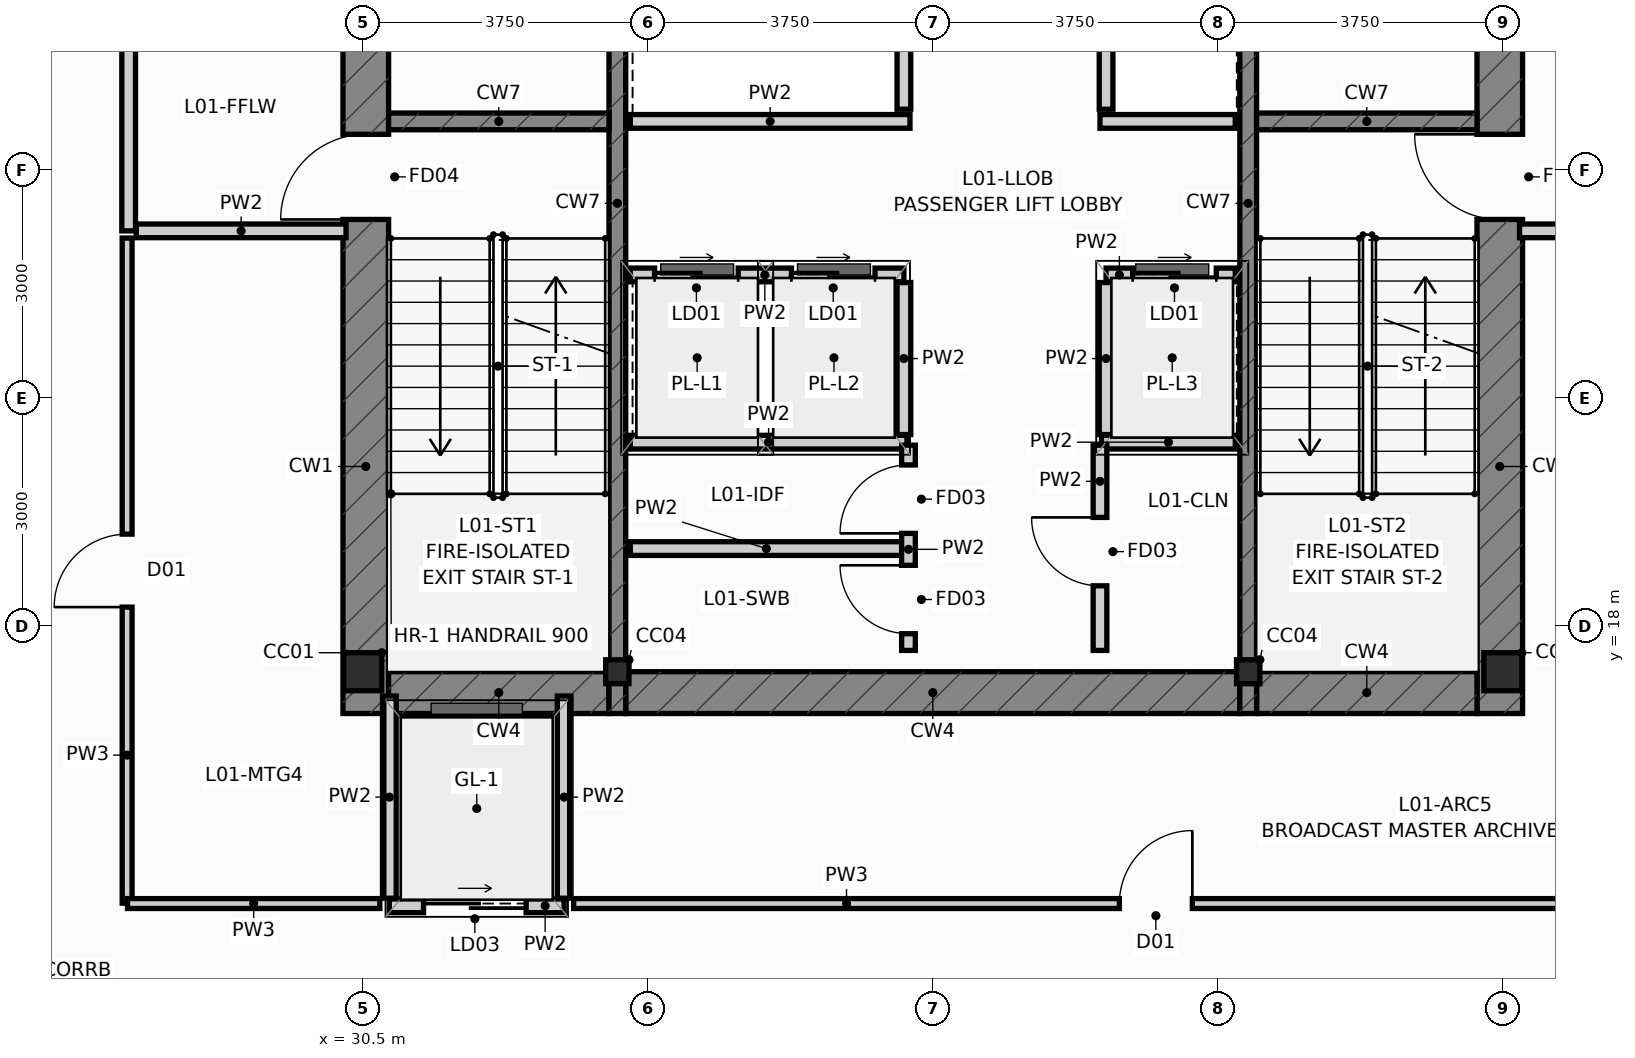
"""IFC4 building model, lengths in metres.
Left out: names, types, materials, properties, quantities, classifications, styles, units other than length and angle.
Written with IfcOpenShell. Run it as: python <this file> out.ifc"""

import sys

from ifc_helpers import new_model, si_unit, direction, frame, frame_2d, origin, origin_2d, place, context, subcontext, project, spatial, rectangle, i_section, extrude, source, transform, mapped, element, fill, save


model = new_model("IFC4")
c1 = context("Model", 3, precision=1e-05, world=origin(), true_north=direction((0.0, 1.0)))
c2 = subcontext(c1, "Body", "Model", "MODEL_VIEW")
j1 = project(units=[si_unit("LENGTHUNIT", "METRE"), si_unit("PLANEANGLEUNIT", "RADIAN")], contexts=[c1])
p1 = place(None, origin())
s1 = spatial("IfcSite", under=j1, at=p1, CompositionType="ELEMENT")
p2 = place(p1, origin())
s2 = spatial("IfcBuilding", under=s1, at=p2, CompositionType="ELEMENT")
p3 = place(p2, frame((0.0, 0.0, 5.4)))
s3 = spatial("IfcBuildingStorey", under=s2, at=p3, CompositionType="ELEMENT", Elevation=5.4)
m1 = source(origin(), c2, "Body", "SweptSolid", [
    extrude(i_section(OverallWidth=0.5, OverallDepth=0.5, WebThickness=0.028, FlangeThickness=0.04, at=origin_2d()), origin(), (0.0, 0.0, 1.0), 4.8),
])
for number, where, z_axis, x_axis in (
    (1, (30.5, 17.4, 0.0), (0.0, 0.0, 1.0), (1.0, 0.0, 0.0)),
    (2, (45.5, 17.4, 0.0), (0.0, 0.0, 1.0), (1.0, 0.0, 0.0)),
):
    element("IfcColumn", number, at=place(p3, frame(where, z_axis=z_axis, x_axis=x_axis)), inside=s3, PredefinedType="COLUMN", context=c2, shape_type="MappedRepresentation", body=[
        mapped(m1, transform((0.0, 0.0, 0.0), scale=1.0)),
    ])
m2 = source(origin(), c2, "Body", "SweptSolid", [
    extrude(i_section(OverallWidth=0.307, OverallDepth=0.315, WebThickness=0.012, FlangeThickness=0.019, at=origin_2d()), origin(), (0.0, 0.0, 1.0), 4.8),
])
for number, where, z_axis, x_axis in (
    (3, (33.85, 17.4, 0.0), (0.0, 0.0, 1.0), (1.0, 0.0, 0.0)),
    (4, (42.15, 17.4, 0.0), (0.0, 0.0, 1.0), (1.0, 0.0, 0.0)),
):
    element("IfcColumn", number, at=place(p3, frame(where, z_axis=z_axis, x_axis=x_axis)), inside=s3, PredefinedType="COLUMN", context=c2, shape_type="MappedRepresentation", body=[
        mapped(m2, transform((0.0, 0.0, 0.0), scale=1.0)),
    ])
p4 = place(p3, frame((30.54, 16.85, 0.0), z_axis=(0.0, 0.0, 1.0), x_axis=(0.0, 1.0, 0.0)))
e5 = element("IfcWall", 5, at=p4, inside=s3, PredefinedType="SHEAR", context=c2, shape_type="SweptSolid", body=[
    extrude(rectangle(XDim=13.425, YDim=0.6, at=frame_2d((6.712, 0.0))), origin(), (0.0, 0.0, 1.0), 4.8),
])
p5 = place(p4, frame((6.5, 0.0, 0.0)))
e6 = element("IfcOpeningElement", 6, at=p5, cuts=e5, PredefinedType="OPENING", context=c2, shape_type="SweptSolid", body=[
    extrude(rectangle(XDim=1.12, YDim=2.15, at=frame_2d((0.56, 1.075))), frame((0.0, 0.312, 0.0), z_axis=(0.0, -1.0, 0.0), x_axis=(1.0, 0.0, 0.0)), (0.0, 0.0, 1.0), 0.624),
])
p6 = place(p4, frame((10.95, 0.0, 0.0)))
e7 = element("IfcOpeningElement", 7, at=p6, cuts=e5, PredefinedType="OPENING", context=c2, shape_type="SweptSolid", body=[
    extrude(rectangle(XDim=1.2, YDim=2.2, at=frame_2d((0.6, 1.1))), frame((0.0, 0.312, 0.0), z_axis=(0.0, -1.0, 0.0), x_axis=(1.0, 0.0, 0.0)), (0.0, 0.0, 1.0), 0.624),
])
p7 = place(p3, frame((45.46, 16.85, 0.0), z_axis=(0.0, 0.0, 1.0), x_axis=(0.0, 1.0, 0.0)))
e8 = element("IfcWall", 8, at=p7, inside=s3, PredefinedType="SHEAR", context=c2, shape_type="SweptSolid", body=[
    extrude(rectangle(XDim=13.425, YDim=0.6, at=frame_2d((6.712, 0.0))), origin(), (0.0, 0.0, 1.0), 4.8),
])
p8 = place(p7, frame((6.5, 0.0, 0.0)))
e9 = element("IfcOpeningElement", 9, at=p8, cuts=e8, PredefinedType="OPENING", context=c2, shape_type="SweptSolid", body=[
    extrude(rectangle(XDim=1.12, YDim=2.15, at=frame_2d((0.56, 1.075))), frame((0.0, 0.312, 0.0), z_axis=(0.0, -1.0, 0.0), x_axis=(1.0, 0.0, 0.0)), (0.0, 0.0, 1.0), 0.624),
])
p9 = place(p7, frame((10.95, 0.0, 0.0)))
e10 = element("IfcOpeningElement", 10, at=p9, cuts=e8, PredefinedType="OPENING", context=c2, shape_type="SweptSolid", body=[
    extrude(rectangle(XDim=1.2, YDim=2.2, at=frame_2d((0.6, 1.1))), frame((0.0, 0.312, 0.0), z_axis=(0.0, -1.0, 0.0), x_axis=(1.0, 0.0, 0.0)), (0.0, 0.0, 1.0), 0.624),
])
p10 = place(p3, frame((30.84, 17.125, 0.0), z_axis=(0.0, 0.0, 1.0), x_axis=(1.0, 0.0, 0.0)))
e11 = element("IfcWall", 11, at=p10, inside=s3, PredefinedType="SHEAR", context=c2, shape_type="SweptSolid", body=[
    extrude(rectangle(XDim=2.9, YDim=0.55, at=frame_2d((1.45, 0.0))), origin(), (0.0, 0.0, 1.0), 4.8),
])
p11 = place(p3, frame((33.96, 17.125, 0.0), z_axis=(0.0, 0.0, 1.0), x_axis=(1.0, 0.0, 0.0)))
e12 = element("IfcWall", 12, at=p11, inside=s3, PredefinedType="SHEAR", context=c2, shape_type="SweptSolid", body=[
    extrude(rectangle(XDim=8.08, YDim=0.55, at=frame_2d((4.04, 0.0))), origin(), (0.0, 0.0, 1.0), 4.8),
])
p12 = place(p3, frame((42.26, 17.125, 0.0), z_axis=(0.0, 0.0, 1.0), x_axis=(1.0, 0.0, 0.0)))
e13 = element("IfcWall", 13, at=p12, inside=s3, PredefinedType="SHEAR", context=c2, shape_type="SweptSolid", body=[
    extrude(rectangle(XDim=2.9, YDim=0.55, at=frame_2d((1.45, 0.0))), origin(), (0.0, 0.0, 1.0), 4.8),
])
for number, where, z_axis, x_axis in (
    (14, (33.85, 16.85, 0.0), (0.0, 0.0, 1.0), (0.0, 1.0, 0.0)),
    (15, (42.15, 16.85, 0.0), (0.0, 0.0, 1.0), (0.0, 1.0, 0.0)),
):
    element("IfcWall", number, at=place(p3, frame(where, z_axis=z_axis, x_axis=x_axis)), inside=s3, PredefinedType="SHEAR", context=c2, shape_type="SweptSolid", body=[
        extrude(rectangle(XDim=13.425, YDim=0.22, at=frame_2d((6.712, 0.0))), origin(), (0.0, 0.0, 1.0), 4.8),
    ])
for number, where, z_axis, x_axis in (
    (16, (30.84, 24.64, 0.0), (0.0, 0.0, 1.0), (1.0, 0.0, 0.0)),
    (17, (42.26, 24.64, 0.0), (0.0, 0.0, 1.0), (1.0, 0.0, 0.0)),
):
    element("IfcWall", number, at=place(p3, frame(where, z_axis=z_axis, x_axis=x_axis)), inside=s3, PredefinedType="SHEAR", context=c2, shape_type="SweptSolid", body=[
        extrude(rectangle(XDim=2.9, YDim=0.22, at=frame_2d((1.45, 0.0))), origin(), (0.0, 0.0, 1.0), 4.8),
    ])
p13 = place(p3, frame((30.85, 14.32, 0.0), z_axis=(0.0, 0.0, 1.0), x_axis=(1.0, 0.0, 0.0)))
e18 = element("IfcWall", 18, at=p13, inside=s3, PredefinedType="PARTITIONING", context=c2, shape_type="SweptSolid", body=[
    extrude(rectangle(XDim=2.3, YDim=0.18, at=frame_2d((1.15, 0.0))), origin(), (0.0, 0.0, 1.0), 4.48),
])
p14 = place(p13, frame((0.45, 0.0, 0.0)))
e19 = element("IfcOpeningElement", 19, at=p14, cuts=e18, PredefinedType="OPENING", context=c2, shape_type="SweptSolid", body=[
    extrude(rectangle(XDim=1.35, YDim=2.25, at=frame_2d((0.675, 1.125))), frame((0.0, 0.102, 0.0), z_axis=(0.0, -1.0, 0.0), x_axis=(1.0, 0.0, 0.0)), (0.0, 0.0, 1.0), 0.204),
])
p15 = place(p3, frame((30.85, 14.42, 0.0), z_axis=(0.0, 0.0, 1.0), x_axis=(0.0, 1.0, 0.0)))
e20 = element("IfcWall", 20, at=p15, inside=s3, PredefinedType="PARTITIONING", context=c2, shape_type="SweptSolid", body=[
    extrude(rectangle(XDim=2.66, YDim=0.18, at=frame_2d((1.33, 0.0))), origin(), (0.0, 0.0, 1.0), 3.854),
])
p16 = place(p3, frame((33.15, 14.42, 0.0), z_axis=(0.0, 0.0, 1.0), x_axis=(0.0, 1.0, 0.0)))
e21 = element("IfcWall", 21, at=p16, inside=s3, PredefinedType="PARTITIONING", context=c2, shape_type="SweptSolid", body=[
    extrude(rectangle(XDim=2.66, YDim=0.18, at=frame_2d((1.33, 0.0))), origin(), (0.0, 0.0, 1.0), 4.48),
])
p17 = place(p3, frame((34.02, 22.62, 0.0), z_axis=(0.0, 0.0, 1.0), x_axis=(1.0, 0.0, 0.0)))
e22 = element("IfcWall", 22, at=p17, inside=s3, PredefinedType="PARTITIONING", context=c2, shape_type="SweptSolid", body=[
    extrude(rectangle(XDim=3.6, YDim=0.18, at=frame_2d((1.8, 0.0))), origin(), (0.0, 0.0, 1.0), 4.48),
])
p18 = place(p17, frame((0.32, 0.0, 0.0)))
e23 = element("IfcOpeningElement", 23, at=p18, cuts=e22, PredefinedType="OPENING", context=c2, shape_type="SweptSolid", body=[
    extrude(rectangle(XDim=1.1, YDim=2.2, at=frame_2d((0.55, 1.1))), frame((0.0, 0.102, 0.0), z_axis=(0.0, -1.0, 0.0), x_axis=(1.0, 0.0, 0.0)), (0.0, 0.0, 1.0), 0.204),
])
p19 = place(p17, frame((2.12, 0.0, 0.0)))
e24 = element("IfcOpeningElement", 24, at=p19, cuts=e22, PredefinedType="OPENING", context=c2, shape_type="SweptSolid", body=[
    extrude(rectangle(XDim=1.1, YDim=2.2, at=frame_2d((0.55, 1.1))), frame((0.0, 0.102, 0.0), z_axis=(0.0, -1.0, 0.0), x_axis=(1.0, 0.0, 0.0)), (0.0, 0.0, 1.0), 0.204),
])
p20 = place(p3, frame((40.28, 22.62, 0.0), z_axis=(0.0, 0.0, 1.0), x_axis=(1.0, 0.0, 0.0)))
e25 = element("IfcWall", 25, at=p20, inside=s3, PredefinedType="PARTITIONING", context=c2, shape_type="SweptSolid", body=[
    extrude(rectangle(XDim=1.7, YDim=0.18, at=frame_2d((0.85, 0.0))), origin(), (0.0, 0.0, 1.0), 4.48),
])
p21 = place(p20, frame((0.35, 0.0, 0.0)))
e26 = element("IfcOpeningElement", 26, at=p21, cuts=e25, PredefinedType="OPENING", context=c2, shape_type="SweptSolid", body=[
    extrude(rectangle(XDim=1.1, YDim=2.2, at=frame_2d((0.55, 1.1))), frame((0.0, 0.102, 0.0), z_axis=(0.0, -1.0, 0.0), x_axis=(1.0, 0.0, 0.0)), (0.0, 0.0, 1.0), 0.204),
])
for number, where, z_axis, x_axis in (
    (27, (37.62, 20.52, 0.0), (0.0, 0.0, 1.0), (0.0, 1.0, 0.0)),
    (28, (40.28, 20.52, 0.0), (0.0, 0.0, 1.0), (0.0, 1.0, 0.0)),
    (29, (37.62, 24.8, 0.0), (0.0, 0.0, 1.0), (0.0, 1.0, 0.0)),
    (30, (40.28, 24.8, 0.0), (0.0, 0.0, 1.0), (0.0, 1.0, 0.0)),
):
    element("IfcWall", number, at=place(p3, frame(where, z_axis=z_axis, x_axis=x_axis)), inside=s3, PredefinedType="PARTITIONING", context=c2, shape_type="SweptSolid", body=[
        extrude(rectangle(XDim=2.0, YDim=0.18, at=frame_2d((1.0, 0.0))), origin(), (0.0, 0.0, 1.0), 4.48),
    ])
p22 = place(p3, frame((34.02, 24.64, 0.0), z_axis=(0.0, 0.0, 1.0), x_axis=(1.0, 0.0, 0.0)))
e31 = element("IfcWall", 31, at=p22, inside=s3, PredefinedType="PARTITIONING", context=c2, shape_type="SweptSolid", body=[
    extrude(rectangle(XDim=3.68, YDim=0.18, at=frame_2d((1.84, 0.0))), origin(), (0.0, 0.0, 1.0), 4.48),
])
p23 = place(p3, frame((40.2, 24.64, 0.0), z_axis=(0.0, 0.0, 1.0), x_axis=(1.0, 0.0, 0.0)))
e32 = element("IfcWall", 32, at=p23, inside=s3, PredefinedType="PARTITIONING", context=c2, shape_type="SweptSolid", body=[
    extrude(rectangle(XDim=1.78, YDim=0.18, at=frame_2d((0.89, 0.0))), origin(), (0.0, 0.0, 1.0), 4.48),
])
p24 = place(p3, frame((27.42, 23.2, 0.0), z_axis=(0.0, 0.0, 1.0), x_axis=(0.0, 1.0, 0.0)))
e33 = element("IfcWall", 33, at=p24, inside=s3, PredefinedType="PARTITIONING", context=c2, shape_type="SweptSolid", body=[
    extrude(rectangle(XDim=6.4, YDim=0.18, at=frame_2d((3.2, 0.0))), origin(), (0.0, 0.0, 1.0), 4.106),
])
p25 = place(p24, frame((2.65, 0.0, 0.0)))
e34 = element("IfcOpeningElement", 34, at=p25, cuts=e33, PredefinedType="OPENING", context=c2, shape_type="SweptSolid", body=[
    extrude(rectangle(XDim=1.05, YDim=2.15, at=frame_2d((0.525, 1.075))), frame((0.0, 0.102, 0.0), z_axis=(0.0, -1.0, 0.0), x_axis=(1.0, 0.0, 0.0)), (0.0, 0.0, 1.0), 0.204),
])
for number, where, z_axis, x_axis in (
    (35, (27.52, 23.2, 0.0), (0.0, 0.0, 1.0), (1.0, 0.0, 0.0)),
    (36, (45.72, 23.2, 0.0), (0.0, 0.0, 1.0), (1.0, 0.0, 0.0)),
):
    element("IfcWall", number, at=place(p3, frame(where, z_axis=z_axis, x_axis=x_axis)), inside=s3, PredefinedType="PARTITIONING", context=c2, shape_type="SweptSolid", body=[
        extrude(rectangle(XDim=2.76, YDim=0.18, at=frame_2d((1.38, 0.0))), origin(), (0.0, 0.0, 1.0), 4.48),
    ])
p26 = place(p3, frame((34.02, 20.42, 0.0), z_axis=(0.0, 0.0, 1.0), x_axis=(1.0, 0.0, 0.0)))
e37 = element("IfcWall", 37, at=p26, inside=s3, PredefinedType="PARTITIONING", context=c2, shape_type="SweptSolid", body=[
    extrude(rectangle(XDim=3.64, YDim=0.18, at=frame_2d((1.82, 0.0))), origin(), (0.0, 0.0, 1.0), 4.48),
])
p27 = place(p3, frame((40.22, 20.42, 0.0), z_axis=(0.0, 0.0, 1.0), x_axis=(1.0, 0.0, 0.0)))
e38 = element("IfcWall", 38, at=p27, inside=s3, PredefinedType="PARTITIONING", context=c2, shape_type="SweptSolid", body=[
    extrude(rectangle(XDim=1.76, YDim=0.18, at=frame_2d((0.88, 0.0))), origin(), (0.0, 0.0, 1.0), 4.48),
])
p28 = place(p3, frame((34.02, 19.02, 0.0), z_axis=(0.0, 0.0, 1.0), x_axis=(1.0, 0.0, 0.0)))
e39 = element("IfcWall", 39, at=p28, inside=s3, PredefinedType="PARTITIONING", context=c2, shape_type="SweptSolid", body=[
    extrude(rectangle(XDim=3.58, YDim=0.18, at=frame_2d((1.79, 0.0))), origin(), (0.0, 0.0, 1.0), 4.48),
])
p29 = place(p3, frame((37.68, 17.68, 0.0), z_axis=(0.0, 0.0, 1.0), x_axis=(0.0, 1.0, 0.0)))
e40 = element("IfcWall", 40, at=p29, inside=s3, PredefinedType="PARTITIONING", context=c2, shape_type="SweptSolid", body=[
    extrude(rectangle(XDim=2.7, YDim=0.18, at=frame_2d((1.35, 0.0))), origin(), (0.0, 0.0, 1.0), 4.48),
])
p30 = place(p29, frame((0.22, 0.0, 0.0)))
e41 = element("IfcOpeningElement", 41, at=p30, cuts=e40, PredefinedType="OPENING", context=c2, shape_type="SweptSolid", body=[
    extrude(rectangle(XDim=0.9, YDim=2.1, at=frame_2d((0.45, 1.05))), frame((0.0, 0.102, 0.0), z_axis=(0.0, -1.0, 0.0), x_axis=(1.0, 0.0, 0.0)), (0.0, 0.0, 1.0), 0.204),
])
p31 = place(p29, frame((1.54, 0.0, 0.0)))
e42 = element("IfcOpeningElement", 42, at=p31, cuts=e40, PredefinedType="OPENING", context=c2, shape_type="SweptSolid", body=[
    extrude(rectangle(XDim=0.9, YDim=2.1, at=frame_2d((0.45, 1.05))), frame((0.0, 0.102, 0.0), z_axis=(0.0, -1.0, 0.0), x_axis=(1.0, 0.0, 0.0)), (0.0, 0.0, 1.0), 0.204),
])
p32 = place(p3, frame((40.2, 17.68, 0.0), z_axis=(0.0, 0.0, 1.0), x_axis=(0.0, 1.0, 0.0)))
e43 = element("IfcWall", 43, at=p32, inside=s3, PredefinedType="PARTITIONING", context=c2, shape_type="SweptSolid", body=[
    extrude(rectangle(XDim=2.7, YDim=0.18, at=frame_2d((1.35, 0.0))), origin(), (0.0, 0.0, 1.0), 4.48),
])
p33 = place(p32, frame((0.85, 0.0, 0.0)))
e44 = element("IfcOpeningElement", 44, at=p33, cuts=e43, PredefinedType="OPENING", context=c2, shape_type="SweptSolid", body=[
    extrude(rectangle(XDim=0.9, YDim=2.1, at=frame_2d((0.45, 1.05))), frame((0.0, 0.102, 0.0), z_axis=(0.0, -1.0, 0.0), x_axis=(1.0, 0.0, 0.0)), (0.0, 0.0, 1.0), 0.204),
])
p34 = place(p3, frame((33.275, 14.35, 0.0), z_axis=(0.0, 0.0, 1.0), x_axis=(1.0, 0.0, 0.0)))
e45 = element("IfcWall", 45, at=p34, inside=s3, PredefinedType="PARTITIONING", context=c2, shape_type="SweptSolid", body=[
    extrude(rectangle(XDim=15.32, YDim=0.13, at=frame_2d((7.66, 0.0))), origin(), (0.0, 0.0, 1.0), 4.48),
])
p35 = place(p34, frame((7.18, 0.0, 0.0)))
e46 = element("IfcOpeningElement", 46, at=p35, cuts=e45, PredefinedType="OPENING", context=c2, shape_type="SweptSolid", body=[
    extrude(rectangle(XDim=0.96, YDim=2.15, at=frame_2d((0.48, 1.075))), frame((0.0, 0.077, 0.0), z_axis=(0.0, -1.0, 0.0), x_axis=(1.0, 0.0, 0.0)), (0.0, 0.0, 1.0), 0.154),
])
p36 = place(p3, frame((27.4, 14.355, 0.0), z_axis=(0.0, 0.0, 1.0), x_axis=(0.0, 1.0, 0.0)))
e47 = element("IfcWall", 47, at=p36, inside=s3, PredefinedType="PARTITIONING", context=c2, shape_type="SweptSolid", body=[
    extrude(rectangle(XDim=8.75, YDim=0.13, at=frame_2d((4.375, 0.0))), origin(), (0.0, 0.0, 1.0), 4.106),
])
p37 = place(p36, frame((3.895, 0.0, 0.0)))
e48 = element("IfcOpeningElement", 48, at=p37, cuts=e47, PredefinedType="OPENING", context=c2, shape_type="SweptSolid", body=[
    extrude(rectangle(XDim=0.96, YDim=2.15, at=frame_2d((0.48, 1.075))), frame((0.0, 0.077, 0.0), z_axis=(0.0, -1.0, 0.0), x_axis=(1.0, 0.0, 0.0)), (0.0, 0.0, 1.0), 0.154),
])
p38 = place(p3, frame((30.725, 14.35, 0.0), z_axis=(0.0, 0.0, 1.0), x_axis=(-1.0, 0.0, 0.0)))
e49 = element("IfcWall", 49, at=p38, inside=s3, PredefinedType="PARTITIONING", context=c2, shape_type="SweptSolid", body=[
    extrude(rectangle(XDim=3.32, YDim=0.13, at=frame_2d((1.66, 0.0))), origin(), (0.0, 0.0, 1.0), 4.48),
])
p39 = place(p5, origin())
e50 = element("IfcDoor", 50, at=p39, inside=s3, OperationType="SINGLE_SWING_LEFT", PredefinedType="DOOR", context=c2, shape_type="SweptSolid", body=[
    extrude(rectangle(XDim=1.12, YDim=2.15, at=frame_2d((0.56, 1.075))), frame((0.0, 0.025, 0.0), z_axis=(0.0, -1.0, 0.0), x_axis=(1.0, 0.0, 0.0)), (0.0, 0.0, 1.0), 0.05),
])
fill(e6, e50)
p40 = place(p8, origin())
e51 = element("IfcDoor", 51, at=p40, inside=s3, OperationType="SINGLE_SWING_RIGHT", PredefinedType="DOOR", context=c2, shape_type="SweptSolid", body=[
    extrude(rectangle(XDim=1.12, YDim=2.15, at=frame_2d((0.56, 1.075))), frame((0.0, 0.025, 0.0), z_axis=(0.0, -1.0, 0.0), x_axis=(1.0, 0.0, 0.0)), (0.0, 0.0, 1.0), 0.05),
])
fill(e9, e51)
p41 = place(p14, origin())
e52 = element("IfcDoor", 52, at=p41, inside=s3, OperationType="SLIDING_TO_LEFT", PredefinedType="DOOR", context=c2, shape_type="SweptSolid", body=[
    extrude(rectangle(XDim=1.35, YDim=2.25, at=frame_2d((0.675, 1.125))), frame((0.0, 0.025, 0.0), z_axis=(0.0, -1.0, 0.0), x_axis=(1.0, 0.0, 0.0)), (0.0, 0.0, 1.0), 0.05),
])
fill(e19, e52)
p42 = place(p18, origin())
e53 = element("IfcDoor", 53, at=p42, inside=s3, OperationType="SLIDING_TO_LEFT", PredefinedType="DOOR", context=c2, shape_type="SweptSolid", body=[
    extrude(rectangle(XDim=1.1, YDim=2.2, at=frame_2d((0.55, 1.1))), frame((0.0, 0.025, 0.0), z_axis=(0.0, -1.0, 0.0), x_axis=(1.0, 0.0, 0.0)), (0.0, 0.0, 1.0), 0.05),
])
fill(e23, e53)
p43 = place(p19, origin())
e54 = element("IfcDoor", 54, at=p43, inside=s3, OperationType="SLIDING_TO_RIGHT", PredefinedType="DOOR", context=c2, shape_type="SweptSolid", body=[
    extrude(rectangle(XDim=1.1, YDim=2.2, at=frame_2d((0.55, 1.1))), frame((0.0, 0.025, 0.0), z_axis=(0.0, -1.0, 0.0), x_axis=(1.0, 0.0, 0.0)), (0.0, 0.0, 1.0), 0.05),
])
fill(e24, e54)
p44 = place(p21, origin())
e55 = element("IfcDoor", 55, at=p44, inside=s3, OperationType="SLIDING_TO_LEFT", PredefinedType="DOOR", context=c2, shape_type="SweptSolid", body=[
    extrude(rectangle(XDim=1.1, YDim=2.2, at=frame_2d((0.55, 1.1))), frame((0.0, 0.025, 0.0), z_axis=(0.0, -1.0, 0.0), x_axis=(1.0, 0.0, 0.0)), (0.0, 0.0, 1.0), 0.05),
])
fill(e26, e55)
p45 = place(p30, origin())
e56 = element("IfcDoor", 56, at=p45, inside=s3, OperationType="SINGLE_SWING_RIGHT", PredefinedType="DOOR", context=c2, shape_type="SweptSolid", body=[
    extrude(rectangle(XDim=0.9, YDim=2.1, at=frame_2d((0.45, 1.05))), frame((0.0, 0.025, 0.0), z_axis=(0.0, -1.0, 0.0), x_axis=(1.0, 0.0, 0.0)), (0.0, 0.0, 1.0), 0.05),
])
fill(e41, e56)
p46 = place(p31, origin())
e57 = element("IfcDoor", 57, at=p46, inside=s3, OperationType="SINGLE_SWING_LEFT", PredefinedType="DOOR", context=c2, shape_type="SweptSolid", body=[
    extrude(rectangle(XDim=0.9, YDim=2.1, at=frame_2d((0.45, 1.05))), frame((0.0, 0.025, 0.0), z_axis=(0.0, -1.0, 0.0), x_axis=(1.0, 0.0, 0.0)), (0.0, 0.0, 1.0), 0.05),
])
fill(e42, e57)
p47 = place(p33, origin())
e58 = element("IfcDoor", 58, at=p47, inside=s3, OperationType="SINGLE_SWING_RIGHT", PredefinedType="DOOR", context=c2, shape_type="SweptSolid", body=[
    extrude(rectangle(XDim=0.9, YDim=2.1, at=frame_2d((0.45, 1.05))), frame((0.0, 0.025, 0.0), z_axis=(0.0, -1.0, 0.0), x_axis=(1.0, 0.0, 0.0)), (0.0, 0.0, 1.0), 0.05),
])
fill(e44, e58)
p48 = place(p35, origin())
e59 = element("IfcDoor", 59, at=p48, inside=s3, OperationType="SINGLE_SWING_RIGHT", PredefinedType="DOOR", context=c2, shape_type="SweptSolid", body=[
    extrude(rectangle(XDim=0.96, YDim=2.15, at=frame_2d((0.48, 1.075))), frame((0.0, 0.025, 0.0), z_axis=(0.0, -1.0, 0.0), x_axis=(1.0, 0.0, 0.0)), (0.0, 0.0, 1.0), 0.05),
])
fill(e46, e59)
p49 = place(p37, origin())
e60 = element("IfcDoor", 60, at=p49, inside=s3, OperationType="SINGLE_SWING_LEFT", PredefinedType="DOOR", context=c2, shape_type="SweptSolid", body=[
    extrude(rectangle(XDim=0.96, YDim=2.15, at=frame_2d((0.48, 1.075))), frame((0.0, 0.025, 0.0), z_axis=(0.0, -1.0, 0.0), x_axis=(1.0, 0.0, 0.0)), (0.0, 0.0, 1.0), 0.05),
])
fill(e48, e60)
save(model, sys.argv[1])
